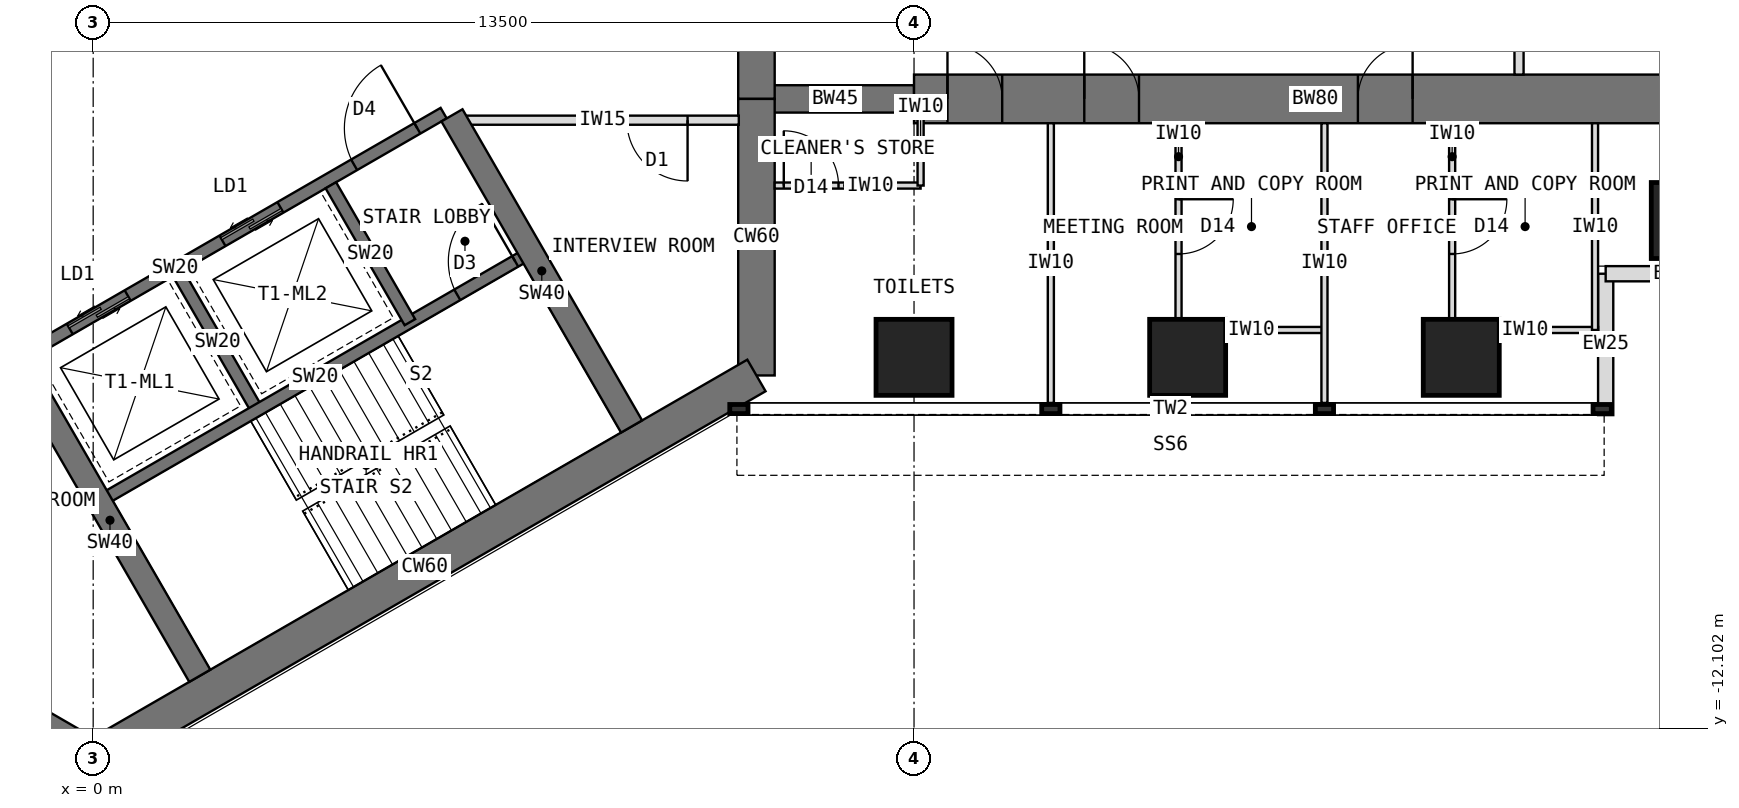
"""IFC4 building model, lengths in metres.
Left out: names, types, materials, properties, quantities, classifications, styles, units other than length and angle.
Written with IfcOpenShell. Run it as: python <this file> out.ifc"""

import sys

from ifc_helpers import new_model, si_unit, direction, frame, frame_2d, origin, origin_2d, place, context, subcontext, project, spatial, rectangle, extrude, element, fill, save


model = new_model("IFC4")
c1 = context("Model", 3, precision=1e-05, world=origin(), true_north=direction((0.0, 1.0)))
c2 = subcontext(c1, "Body", "Model", "MODEL_VIEW")
j1 = project(units=[si_unit("LENGTHUNIT", "METRE"), si_unit("PLANEANGLEUNIT", "RADIAN")], contexts=[c1])
p1 = place(None, origin())
s1 = spatial("IfcSite", under=j1, at=p1, CompositionType="ELEMENT")
p2 = place(p1, origin())
s2 = spatial("IfcBuilding", under=s1, at=p2, CompositionType="ELEMENT")
p3 = place(p2, frame((0.0, 0.0, 157.5)))
s3 = spatial("IfcBuildingStorey", under=s2, at=p3, CompositionType="ELEMENT", Elevation=157.5)
p4 = place(p3, frame((10.908, -6.298, 0.0), z_axis=(0.0, 0.0, 1.0), x_axis=(0.0, 1.0, 0.0)))
e1 = element("IfcWall", 1, at=p4, inside=s3, PredefinedType="SHEAR", context=c2, shape_type="SweptSolid", body=[
    extrude(rectangle(XDim=4.548, YDim=0.6, at=frame_2d((2.274, 0.0))), origin(), (0.0, 0.0, 1.0), 4.0),
])
p5 = place(p3, frame((10.908, -1.75, 0.0), z_axis=(0.0, 0.0, 1.0), x_axis=(0.0, 1.0, 0.0)))
e2 = element("IfcWall", 2, at=p5, inside=s3, PredefinedType="SHEAR", context=c2, shape_type="SweptSolid", body=[
    extrude(rectangle(XDim=3.5, YDim=0.6, at=frame_2d((1.75, 0.0))), origin(), (0.0, 0.0, 1.0), 4.0),
])
p6 = place(p5, frame((0.85, 0.0, 0.0)))
e3 = element("IfcOpeningElement", 3, at=p6, cuts=e2, PredefinedType="OPENING", context=c2, shape_type="SweptSolid", body=[
    extrude(rectangle(XDim=1.8, YDim=2.1, at=frame_2d((0.9, 1.05))), frame((0.0, 0.31, 0.0), z_axis=(0.0, -1.0, 0.0), x_axis=(1.0, 0.0, 0.0)), (0.0, 0.0, 1.0), 0.62),
])
p7 = place(p3, frame((-3.939, -10.322, 0.0), z_axis=(0.0, 0.0, 1.0), x_axis=(0.866011268655, -0.500024481964, 0.0)))
e4 = element("IfcWall", 4, at=p7, inside=s3, PredefinedType="SHEAR", context=c2, shape_type="SweptSolid", body=[
    extrude(rectangle(XDim=4.548, YDim=0.6, at=frame_2d((2.274, 0.0))), origin(), (0.0, 0.0, 1.0), 4.0),
])
p8 = place(p3, frame((0.0, -12.596, 0.0), z_axis=(0.0, 0.0, 1.0), x_axis=(0.866021940709, 0.500005998175, 0.0)))
e5 = element("IfcWall", 5, at=p8, inside=s3, PredefinedType="SHEAR", context=c2, shape_type="SweptSolid", body=[
    extrude(rectangle(XDim=12.596, YDim=0.6, at=frame_2d((6.298, 0.0))), origin(), (0.0, 0.0, 1.0), 4.0),
])
p9 = place(p3, frame((10.908, -1.75, 0.0), z_axis=(0.0, 0.0, 1.0), x_axis=(1.0, 0.0, 0.0)))
e6 = element("IfcWall", 6, at=p9, inside=s3, PredefinedType="SHEAR", context=c2, shape_type="SweptSolid", body=[
    extrude(rectangle(XDim=2.592, YDim=0.45, at=frame_2d((1.296, 0.0))), origin(), (0.0, 0.0, 1.0), 4.0),
])
p10 = place(p3, frame((13.5, -1.75, 0.0), z_axis=(0.0, 0.0, 1.0), x_axis=(1.0, 0.0, 0.0)))
e7 = element("IfcWall", 7, at=p10, inside=s3, PredefinedType="SHEAR", context=c2, shape_type="SweptSolid", body=[
    extrude(rectangle(XDim=13.2, YDim=0.8, at=frame_2d((6.6, 0.0))), origin(), (0.0, 0.0, 1.0), 4.0),
])
p11 = place(p10, frame((0.55, 0.0, 0.0)))
e8 = element("IfcOpeningElement", 8, at=p11, cuts=e7, PredefinedType="OPENING", context=c2, shape_type="SweptSolid", body=[
    extrude(rectangle(XDim=0.9, YDim=2.1, at=frame_2d((0.45, 1.05))), frame((0.0, 0.41, 0.0), z_axis=(0.0, -1.0, 0.0), x_axis=(1.0, 0.0, 0.0)), (0.0, 0.0, 1.0), 0.82),
])
p12 = place(p10, frame((2.8, 0.0, 0.0)))
e9 = element("IfcOpeningElement", 9, at=p12, cuts=e7, PredefinedType="OPENING", context=c2, shape_type="SweptSolid", body=[
    extrude(rectangle(XDim=0.9, YDim=2.1, at=frame_2d((0.45, 1.05))), frame((0.0, 0.41, 0.0), z_axis=(0.0, -1.0, 0.0), x_axis=(1.0, 0.0, 0.0)), (0.0, 0.0, 1.0), 0.82),
])
p13 = place(p10, frame((7.3, 0.0, 0.0)))
e10 = element("IfcOpeningElement", 10, at=p13, cuts=e7, PredefinedType="OPENING", context=c2, shape_type="SweptSolid", body=[
    extrude(rectangle(XDim=0.9, YDim=2.1, at=frame_2d((0.45, 1.05))), frame((0.0, 0.41, 0.0), z_axis=(0.0, -1.0, 0.0), x_axis=(1.0, 0.0, 0.0)), (0.0, 0.0, 1.0), 0.82),
])
for number, where, z_axis, x_axis in (
    (11, (13.5, -6.0, 0.0), (0.0, 0.0, 1.0), (1.0, 0.0, 0.0)),
    (12, (18.0, -6.0, 0.0), (0.0, 0.0, 1.0), (1.0, 0.0, 0.0)),
    (13, (22.5, -6.0, 0.0), (0.0, 0.0, 1.0), (1.0, 0.0, 0.0)),
    (14, (26.25, -3.75, 0.0), (0.0, 0.0, 1.0), (1.0, 0.0, 0.0)),
):
    element("IfcColumn", number, at=place(p3, frame(where, z_axis=z_axis, x_axis=x_axis)), inside=s3, PredefinedType="COLUMN", context=c2, shape_type="SweptSolid", body=[
        extrude(rectangle(XDim=1.25, YDim=1.25, at=origin_2d()), origin(), (0.0, 0.0, 1.0), 4.0),
    ])
for number, where, z_axis, x_axis in (
    (15, (24.875, -6.95, 0.0), (0.0, 0.0, 1.0), (0.0, 1.0, 0.0)),
    (16, (24.875, -4.625, 0.0), (0.0, 0.0, 1.0), (1.0, 0.0, 0.0)),
):
    element("IfcWall", number, at=place(p3, frame(where, z_axis=z_axis, x_axis=x_axis)), inside=s3, PredefinedType="STANDARD", context=c2, shape_type="SweptSolid", body=[
        extrude(rectangle(XDim=2.325, YDim=0.25, at=frame_2d((1.163, 0.0))), origin(), (0.0, 0.0, 1.0), 3.8),
    ])
p14 = place(p3, frame((-1.164, -5.984, 0.0), z_axis=(0.0, 0.0, 1.0), x_axis=(0.866026010844, 0.49999894854, 0.0)))
e17 = element("IfcWall", 17, at=p14, inside=s3, PredefinedType="SHEAR", context=c2, shape_type="SweptSolid", body=[
    extrude(rectangle(XDim=8.0, YDim=0.2, at=frame_2d((4.0, 0.0))), origin(), (0.0, 0.0, 1.0), 4.0),
])
p15 = place(p14, frame((6.3, 0.0, 0.0)))
e18 = element("IfcOpeningElement", 18, at=p15, cuts=e17, PredefinedType="OPENING", context=c2, shape_type="SweptSolid", body=[
    extrude(rectangle(XDim=1.2, YDim=2.1, at=frame_2d((0.6, 1.05))), frame((0.0, 0.11, 0.0), z_axis=(0.0, -1.0, 0.0), x_axis=(1.0, 0.0, 0.0)), (0.0, 0.0, 1.0), 0.22),
])
p16 = place(p14, frame((0.9, 0.0, 0.0)))
e19 = element("IfcOpeningElement", 19, at=p16, cuts=e17, PredefinedType="OPENING", context=c2, shape_type="SweptSolid", body=[
    extrude(rectangle(XDim=1.1, YDim=2.2, at=frame_2d((0.55, 1.1))), frame((0.0, 0.11, 0.0), z_axis=(0.0, -1.0, 0.0), x_axis=(1.0, 0.0, 0.0)), (0.0, 0.0, 1.0), 0.22),
])
p17 = place(p14, frame((3.8, 0.0, 0.0)))
e20 = element("IfcOpeningElement", 20, at=p17, cuts=e17, PredefinedType="OPENING", context=c2, shape_type="SweptSolid", body=[
    extrude(rectangle(XDim=1.1, YDim=2.2, at=frame_2d((0.55, 1.1))), frame((0.0, 0.11, 0.0), z_axis=(0.0, -1.0, 0.0), x_axis=(1.0, 0.0, 0.0)), (0.0, 0.0, 1.0), 0.22),
])
p18 = place(p3, frame((1.397, -4.62, 0.0), z_axis=(0.0, 0.0, 1.0), x_axis=(0.499936506574, -0.866062058628, 0.0)))
e21 = element("IfcWall", 21, at=p18, inside=s3, PredefinedType="SHEAR", context=c2, shape_type="SweptSolid", body=[
    extrude(rectangle(XDim=2.6, YDim=0.2, at=frame_2d((1.3, 0.0))), origin(), (0.0, 0.0, 1.0), 4.0),
])
p19 = place(p3, frame((3.909, -3.17, 0.0), z_axis=(0.0, 0.0, 1.0), x_axis=(0.49997716683, -0.86603858612, 0.0)))
e22 = element("IfcWall", 22, at=p19, inside=s3, PredefinedType="SHEAR", context=c2, shape_type="SweptSolid", body=[
    extrude(rectangle(XDim=2.6, YDim=0.2, at=frame_2d((1.3, 0.0))), origin(), (0.0, 0.0, 1.0), 4.0),
])
p20 = place(p3, frame((0.186, -8.322, 0.0), z_axis=(0.0, 0.0, 1.0), x_axis=(0.866026010844, 0.49999894854, 0.0)))
e23 = element("IfcWall", 23, at=p20, inside=s3, PredefinedType="SHEAR", context=c2, shape_type="SweptSolid", body=[
    extrude(rectangle(XDim=8.0, YDim=0.2, at=frame_2d((4.0, 0.0))), origin(), (0.0, 0.0, 1.0), 4.0),
])
p21 = place(p20, frame((6.7, 0.0, 0.0)))
e24 = element("IfcOpeningElement", 24, at=p21, cuts=e23, PredefinedType="OPENING", context=c2, shape_type="SweptSolid", body=[
    extrude(rectangle(XDim=1.1, YDim=2.1, at=frame_2d((0.55, 1.05))), frame((0.0, 0.11, 0.0), z_axis=(0.0, -1.0, 0.0), x_axis=(1.0, 0.0, 0.0)), (0.0, 0.0, 1.0), 0.22),
])
p22 = place(p3, frame((5.901, -2.02, 0.0), z_axis=(0.0, 0.0, 1.0), x_axis=(0.500027676417, -0.866009424208, 0.0)))
e25 = element("IfcWall", 25, at=p22, inside=s3, PredefinedType="SHEAR", context=c2, shape_type="SweptSolid", body=[
    extrude(rectangle(XDim=5.908, YDim=0.4, at=frame_2d((2.954, 0.0))), origin(), (0.0, 0.0, 1.0), 4.0),
])
p23 = place(p3, frame((-1.201, -6.12, 0.0), z_axis=(0.0, 0.0, 1.0), x_axis=(0.49999668571, -0.866027317282, 0.0)))
e26 = element("IfcWall", 26, at=p23, inside=s3, PredefinedType="SHEAR", context=c2, shape_type="SweptSolid", body=[
    extrude(rectangle(XDim=5.908, YDim=0.4, at=frame_2d((2.954, 0.0))), origin(), (0.0, 0.0, 1.0), 4.0),
])
for number, where, z_axis, x_axis in (
    (27, (15.75, -2.15, 0.0), (0.0, 0.0, 1.0), (0.0, -1.0, 0.0)),
    (28, (20.25, -2.15, 0.0), (0.0, 0.0, 1.0), (0.0, -1.0, 0.0)),
):
    element("IfcWall", number, at=place(p3, frame(where, z_axis=z_axis, x_axis=x_axis)), inside=s3, PredefinedType="PARTITIONING", context=c2, shape_type="SweptSolid", body=[
        extrude(rectangle(XDim=4.6, YDim=0.1, at=frame_2d((2.3, 0.0))), origin(), (0.0, 0.0, 1.0), 3.8),
    ])
p24 = place(p3, frame((17.85, -5.55, 0.0), z_axis=(0.0, 0.0, 1.0), x_axis=(1.0, 0.0, 0.0)))
e29 = element("IfcWall", 29, at=p24, inside=s3, PredefinedType="PARTITIONING", context=c2, shape_type="SweptSolid", body=[
    extrude(rectangle(XDim=2.4, YDim=0.1, at=frame_2d((1.2, 0.0))), origin(), (0.0, 0.0, 1.0), 3.8),
])
p25 = place(p3, frame((17.85, -2.15, 0.0), z_axis=(0.0, 0.0, 1.0), x_axis=(0.0, -1.0, 0.0)))
e30 = element("IfcWall", 30, at=p25, inside=s3, PredefinedType="PARTITIONING", context=c2, shape_type="SweptSolid", body=[
    extrude(rectangle(XDim=3.4, YDim=0.1, at=frame_2d((1.7, 0.0))), origin(), (0.0, 0.0, 1.0), 3.8),
])
p26 = place(p25, frame((1.25, 0.0, 0.0)))
e31 = element("IfcOpeningElement", 31, at=p26, cuts=e30, PredefinedType="OPENING", context=c2, shape_type="SweptSolid", body=[
    extrude(rectangle(XDim=0.9, YDim=2.1, at=frame_2d((0.45, 1.05))), frame((0.0, 0.06, 0.0), z_axis=(0.0, -1.0, 0.0), x_axis=(1.0, 0.0, 0.0)), (0.0, 0.0, 1.0), 0.12),
])
p27 = place(p3, frame((22.35, -5.55, 0.0), z_axis=(0.0, 0.0, 1.0), x_axis=(1.0, 0.0, 0.0)))
e32 = element("IfcWall", 32, at=p27, inside=s3, PredefinedType="PARTITIONING", context=c2, shape_type="SweptSolid", body=[
    extrude(rectangle(XDim=2.4, YDim=0.1, at=frame_2d((1.2, 0.0))), origin(), (0.0, 0.0, 1.0), 3.8),
])
p28 = place(p3, frame((22.35, -2.15, 0.0), z_axis=(0.0, 0.0, 1.0), x_axis=(0.0, -1.0, 0.0)))
e33 = element("IfcWall", 33, at=p28, inside=s3, PredefinedType="PARTITIONING", context=c2, shape_type="SweptSolid", body=[
    extrude(rectangle(XDim=3.4, YDim=0.1, at=frame_2d((1.7, 0.0))), origin(), (0.0, 0.0, 1.0), 3.8),
])
p29 = place(p28, frame((1.25, 0.0, 0.0)))
e34 = element("IfcOpeningElement", 34, at=p29, cuts=e33, PredefinedType="OPENING", context=c2, shape_type="SweptSolid", body=[
    extrude(rectangle(XDim=0.9, YDim=2.1, at=frame_2d((0.45, 1.05))), frame((0.0, 0.06, 0.0), z_axis=(0.0, -1.0, 0.0), x_axis=(1.0, 0.0, 0.0)), (0.0, 0.0, 1.0), 0.12),
])
p30 = place(p3, frame((24.7, -2.15, 0.0), z_axis=(0.0, 0.0, 1.0), x_axis=(0.0, -1.0, 0.0)))
e35 = element("IfcWall", 35, at=p30, inside=s3, PredefinedType="PARTITIONING", context=c2, shape_type="SweptSolid", body=[
    extrude(rectangle(XDim=3.4, YDim=0.1, at=frame_2d((1.7, 0.0))), origin(), (0.0, 0.0, 1.0), 3.8),
])
p31 = place(p3, frame((11.208, -3.175, 0.0), z_axis=(0.0, 0.0, 1.0), x_axis=(1.0, 0.0, 0.0)))
e36 = element("IfcWall", 36, at=p31, inside=s3, PredefinedType="PARTITIONING", context=c2, shape_type="SweptSolid", body=[
    extrude(rectangle(XDim=2.4, YDim=0.1, at=frame_2d((1.2, 0.0))), origin(), (0.0, 0.0, 1.0), 3.8),
])
p32 = place(p31, frame((0.15, 0.0, 0.0)))
e37 = element("IfcOpeningElement", 37, at=p32, cuts=e36, PredefinedType="OPENING", context=c2, shape_type="SweptSolid", body=[
    extrude(rectangle(XDim=0.9, YDim=2.1, at=frame_2d((0.45, 1.05))), frame((0.0, 0.06, 0.0), z_axis=(0.0, -1.0, 0.0), x_axis=(1.0, 0.0, 0.0)), (0.0, 0.0, 1.0), 0.12),
])
p33 = place(p3, frame((13.608, -1.975, 0.0), z_axis=(0.0, 0.0, 1.0), x_axis=(0.0, -1.0, 0.0)))
e38 = element("IfcWall", 38, at=p33, inside=s3, PredefinedType="PARTITIONING", context=c2, shape_type="SweptSolid", body=[
    extrude(rectangle(XDim=1.2, YDim=0.1, at=frame_2d((0.6, 0.0))), origin(), (0.0, 0.0, 1.0), 3.8),
])
p34 = place(p3, frame((10.618, -2.1, 0.0), z_axis=(0.0, 0.0, 1.0), x_axis=(-1.0, 0.0, 0.0)))
e39 = element("IfcWall", 39, at=p34, inside=s3, PredefinedType="PARTITIONING", context=c2, shape_type="SweptSolid", body=[
    extrude(rectangle(XDim=4.476, YDim=0.15, at=frame_2d((2.238, 0.0))), origin(), (0.0, 0.0, 1.0), 3.8),
])
p35 = place(p34, frame((0.843, 0.0, 0.0)))
e40 = element("IfcOpeningElement", 40, at=p35, cuts=e39, PredefinedType="OPENING", context=c2, shape_type="SweptSolid", body=[
    extrude(rectangle(XDim=1.0, YDim=2.1, at=frame_2d((0.5, 1.05))), frame((0.0, 0.085, 0.0), z_axis=(0.0, -1.0, 0.0), x_axis=(1.0, 0.0, 0.0)), (0.0, 0.0, 1.0), 0.17),
])
p36 = place(p3, frame((23.45, -1.35, 0.0), z_axis=(0.0, 0.0, 1.0), x_axis=(0.0, 1.0, 0.0)))
e41 = element("IfcWall", 41, at=p36, inside=s3, PredefinedType="PARTITIONING", context=c2, shape_type="SweptSolid", body=[
    extrude(rectangle(XDim=2.7, YDim=0.15, at=frame_2d((1.35, 0.0))), origin(), (0.0, 0.0, 1.0), 3.8),
])
p37 = place(p36, frame((0.85, 0.0, 0.0)))
e42 = element("IfcOpeningElement", 42, at=p37, cuts=e41, PredefinedType="OPENING", context=c2, shape_type="SweptSolid", body=[
    extrude(rectangle(XDim=1.0, YDim=2.1, at=frame_2d((0.5, 1.05))), frame((0.0, 0.085, 0.0), z_axis=(0.0, -1.0, 0.0), x_axis=(1.0, 0.0, 0.0)), (0.0, 0.0, 1.0), 0.17),
])
p38 = place(p15, origin())
e43 = element("IfcDoor", 43, at=p38, inside=s3, OperationType="SINGLE_SWING_RIGHT", PredefinedType="DOOR", context=c2, shape_type="SweptSolid", body=[
    extrude(rectangle(XDim=1.2, YDim=2.1, at=frame_2d((0.6, 1.05))), frame((0.0, 0.025, 0.0), z_axis=(0.0, -1.0, 0.0), x_axis=(1.0, 0.0, 0.0)), (0.0, 0.0, 1.0), 0.05),
])
fill(e18, e43)
p39 = place(p16, origin())
e44 = element("IfcDoor", 44, at=p39, inside=s3, OperationType="DOUBLE_DOOR_SLIDING", PredefinedType="DOOR", context=c2, shape_type="SweptSolid", body=[
    extrude(rectangle(XDim=1.1, YDim=2.2, at=frame_2d((0.55, 1.1))), frame((0.0, 0.025, 0.0), z_axis=(0.0, -1.0, 0.0), x_axis=(1.0, 0.0, 0.0)), (0.0, 0.0, 1.0), 0.05),
])
fill(e19, e44)
p40 = place(p17, origin())
e45 = element("IfcDoor", 45, at=p40, inside=s3, OperationType="DOUBLE_DOOR_SLIDING", PredefinedType="DOOR", context=c2, shape_type="SweptSolid", body=[
    extrude(rectangle(XDim=1.1, YDim=2.2, at=frame_2d((0.55, 1.1))), frame((0.0, 0.025, 0.0), z_axis=(0.0, -1.0, 0.0), x_axis=(1.0, 0.0, 0.0)), (0.0, 0.0, 1.0), 0.05),
])
fill(e20, e45)
p41 = place(p21, origin())
e46 = element("IfcDoor", 46, at=p41, inside=s3, OperationType="SINGLE_SWING_RIGHT", PredefinedType="DOOR", context=c2, shape_type="SweptSolid", body=[
    extrude(rectangle(XDim=1.1, YDim=2.1, at=frame_2d((0.55, 1.05))), frame((0.0, 0.025, 0.0), z_axis=(0.0, -1.0, 0.0), x_axis=(1.0, 0.0, 0.0)), (0.0, 0.0, 1.0), 0.05),
])
fill(e24, e46)
p42 = place(p26, origin())
e47 = element("IfcDoor", 47, at=p42, inside=s3, OperationType="SINGLE_SWING_LEFT", PredefinedType="DOOR", context=c2, shape_type="SweptSolid", body=[
    extrude(rectangle(XDim=0.9, YDim=2.1, at=frame_2d((0.45, 1.05))), frame((0.0, 0.025, 0.0), z_axis=(0.0, -1.0, 0.0), x_axis=(1.0, 0.0, 0.0)), (0.0, 0.0, 1.0), 0.05),
])
fill(e31, e47)
p43 = place(p29, origin())
e48 = element("IfcDoor", 48, at=p43, inside=s3, OperationType="SINGLE_SWING_LEFT", PredefinedType="DOOR", context=c2, shape_type="SweptSolid", body=[
    extrude(rectangle(XDim=0.9, YDim=2.1, at=frame_2d((0.45, 1.05))), frame((0.0, 0.025, 0.0), z_axis=(0.0, -1.0, 0.0), x_axis=(1.0, 0.0, 0.0)), (0.0, 0.0, 1.0), 0.05),
])
fill(e34, e48)
p44 = place(p32, origin())
e49 = element("IfcDoor", 49, at=p44, inside=s3, OperationType="SINGLE_SWING_LEFT", PredefinedType="DOOR", context=c2, shape_type="SweptSolid", body=[
    extrude(rectangle(XDim=0.9, YDim=2.1, at=frame_2d((0.45, 1.05))), frame((0.0, 0.025, 0.0), z_axis=(0.0, -1.0, 0.0), x_axis=(1.0, 0.0, 0.0)), (0.0, 0.0, 1.0), 0.05),
])
fill(e37, e49)
p45 = place(p35, origin())
e50 = element("IfcDoor", 50, at=p45, inside=s3, OperationType="SINGLE_SWING_LEFT", PredefinedType="DOOR", context=c2, shape_type="SweptSolid", body=[
    extrude(rectangle(XDim=1.0, YDim=2.1, at=frame_2d((0.5, 1.05))), frame((0.0, 0.025, 0.0), z_axis=(0.0, -1.0, 0.0), x_axis=(1.0, 0.0, 0.0)), (0.0, 0.0, 1.0), 0.05),
])
fill(e40, e50)
p46 = place(p11, origin())
e51 = element("IfcDoor", 51, at=p46, inside=s3, OperationType="SINGLE_SWING_LEFT", PredefinedType="DOOR", context=c2, shape_type="SweptSolid", body=[
    extrude(rectangle(XDim=0.82, YDim=2.06, at=frame_2d((0.45, 1.03))), frame((0.0, 0.025, 0.0), z_axis=(0.0, -1.0, 0.0), x_axis=(1.0, 0.0, 0.0)), (0.0, 0.0, 1.0), 0.05),
    extrude(rectangle(XDim=0.04, YDim=2.1, at=frame_2d((0.02, 1.05))), frame((0.0, 0.4, 0.0), z_axis=(0.0, -1.0, 0.0), x_axis=(1.0, 0.0, 0.0)), (0.0, 0.0, 1.0), 0.8),
    extrude(rectangle(XDim=0.04, YDim=2.1, at=frame_2d((0.88, 1.05))), frame((0.0, 0.4, 0.0), z_axis=(0.0, -1.0, 0.0), x_axis=(1.0, 0.0, 0.0)), (0.0, 0.0, 1.0), 0.8),
    extrude(rectangle(XDim=0.82, YDim=0.04, at=frame_2d((0.45, 2.08))), frame((0.0, 0.4, 0.0), z_axis=(0.0, -1.0, 0.0), x_axis=(1.0, 0.0, 0.0)), (0.0, 0.0, 1.0), 0.8),
])
fill(e8, e51)
p47 = place(p12, origin())
e52 = element("IfcDoor", 52, at=p47, inside=s3, OperationType="SINGLE_SWING_LEFT", PredefinedType="DOOR", context=c2, shape_type="SweptSolid", body=[
    extrude(rectangle(XDim=0.82, YDim=2.06, at=frame_2d((0.45, 1.03))), frame((0.0, 0.025, 0.0), z_axis=(0.0, -1.0, 0.0), x_axis=(1.0, 0.0, 0.0)), (0.0, 0.0, 1.0), 0.05),
    extrude(rectangle(XDim=0.04, YDim=2.1, at=frame_2d((0.02, 1.05))), frame((0.0, 0.4, 0.0), z_axis=(0.0, -1.0, 0.0), x_axis=(1.0, 0.0, 0.0)), (0.0, 0.0, 1.0), 0.8),
    extrude(rectangle(XDim=0.04, YDim=2.1, at=frame_2d((0.88, 1.05))), frame((0.0, 0.4, 0.0), z_axis=(0.0, -1.0, 0.0), x_axis=(1.0, 0.0, 0.0)), (0.0, 0.0, 1.0), 0.8),
    extrude(rectangle(XDim=0.82, YDim=0.04, at=frame_2d((0.45, 2.08))), frame((0.0, 0.4, 0.0), z_axis=(0.0, -1.0, 0.0), x_axis=(1.0, 0.0, 0.0)), (0.0, 0.0, 1.0), 0.8),
])
fill(e9, e52)
p48 = place(p13, origin())
e53 = element("IfcDoor", 53, at=p48, inside=s3, OperationType="SINGLE_SWING_RIGHT", PredefinedType="DOOR", context=c2, shape_type="SweptSolid", body=[
    extrude(rectangle(XDim=0.82, YDim=2.06, at=frame_2d((0.45, 1.03))), frame((0.0, 0.025, 0.0), z_axis=(0.0, -1.0, 0.0), x_axis=(1.0, 0.0, 0.0)), (0.0, 0.0, 1.0), 0.05),
    extrude(rectangle(XDim=0.04, YDim=2.1, at=frame_2d((0.02, 1.05))), frame((0.0, 0.4, 0.0), z_axis=(0.0, -1.0, 0.0), x_axis=(1.0, 0.0, 0.0)), (0.0, 0.0, 1.0), 0.8),
    extrude(rectangle(XDim=0.04, YDim=2.1, at=frame_2d((0.88, 1.05))), frame((0.0, 0.4, 0.0), z_axis=(0.0, -1.0, 0.0), x_axis=(1.0, 0.0, 0.0)), (0.0, 0.0, 1.0), 0.8),
    extrude(rectangle(XDim=0.82, YDim=0.04, at=frame_2d((0.45, 2.08))), frame((0.0, 0.4, 0.0), z_axis=(0.0, -1.0, 0.0), x_axis=(1.0, 0.0, 0.0)), (0.0, 0.0, 1.0), 0.8),
])
fill(e10, e53)
save(model, sys.argv[1])
